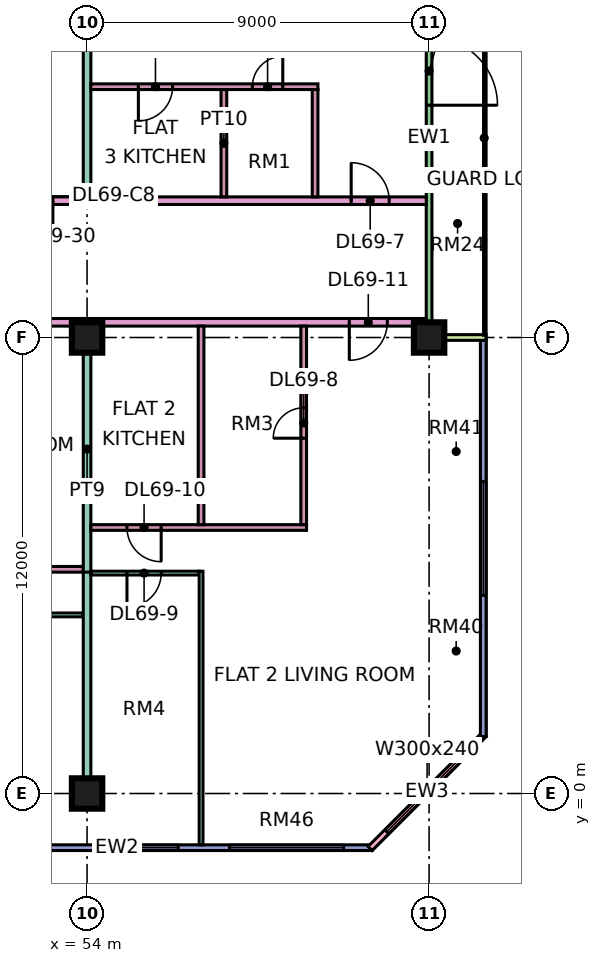
"""IFC4 building model, lengths in metres.
Left out: names, types, materials, properties, quantities, classifications, styles, units other than length and angle.
Written with IfcOpenShell. Run it as: python <this file> out.ifc"""

import sys

from ifc_helpers import new_model, si_unit, direction, frame, frame_2d, origin, origin_2d, place, context, subcontext, project, spatial, rectangle, extrude, element, fill, save


model = new_model("IFC4")
c1 = context("Model", 3, precision=1e-05, world=origin(), true_north=direction((0.0, 1.0)))
c2 = subcontext(c1, "Body", "Model", "MODEL_VIEW")
j1 = project(units=[si_unit("LENGTHUNIT", "METRE"), si_unit("PLANEANGLEUNIT", "RADIAN")], contexts=[c1])
p1 = place(None, origin())
s1 = spatial("IfcSite", under=j1, at=p1, CompositionType="ELEMENT")
p2 = place(p1, origin())
s2 = spatial("IfcBuilding", under=s1, at=p2, CompositionType="ELEMENT")
p3 = place(p2, frame((0.0, 0.0, 295.9)))
s3 = spatial("IfcBuildingStorey", under=s2, at=p3, CompositionType="ELEMENT", Elevation=295.9)
for number, where, z_axis, x_axis in (
    (1, (54.0, 0.0, 0.0), (0.0, 0.0, 1.0), (1.0, 0.0, 0.0)),
    (2, (54.0, 12.0, 0.0), (0.0, 0.0, 1.0), (1.0, 0.0, 0.0)),
    (3, (63.0, 12.0, 0.0), (0.0, 0.0, 1.0), (1.0, 0.0, 0.0)),
):
    element("IfcColumn", number, at=place(p3, frame(where, z_axis=z_axis, x_axis=x_axis)), inside=s3, PredefinedType="COLUMN", context=c2, shape_type="SweptSolid", body=[
        extrude(rectangle(XDim=0.8, YDim=0.8, at=origin_2d()), origin(), (0.0, 0.0, 1.0), 3.75),
    ])
p4 = place(p3, frame((48.075, -1.425, 0.0), z_axis=(0.0, 0.0, 1.0), x_axis=(1.0, 0.0, 0.0)))
e4 = element("IfcWall", 4, at=p4, inside=s3, PredefinedType="SOLIDWALL", context=c2, shape_type="SweptSolid", body=[
    extrude(rectangle(XDim=13.425, YDim=0.15, at=frame_2d((6.712, 0.0))), origin(), (0.0, 0.0, 1.0), 3.35),
])
p5 = place(p4, frame((1.462, 0.0, 0.45)))
e5 = element("IfcOpeningElement", 5, at=p5, cuts=e4, PredefinedType="OPENING", context=c2, shape_type="SweptSolid", body=[
    extrude(rectangle(XDim=3.0, YDim=2.4, at=frame_2d((1.5, 1.2))), frame((0.0, 0.085, 0.0), z_axis=(0.0, -1.0, 0.0), x_axis=(1.0, 0.0, 0.0)), (0.0, 0.0, 1.0), 0.17),
])
p6 = place(p4, frame((6.525, 0.0, 0.45)))
e6 = element("IfcOpeningElement", 6, at=p6, cuts=e4, PredefinedType="OPENING", context=c2, shape_type="SweptSolid", body=[
    extrude(rectangle(XDim=1.8, YDim=2.4, at=frame_2d((0.9, 1.2))), frame((0.0, 0.085, 0.0), z_axis=(0.0, -1.0, 0.0), x_axis=(1.0, 0.0, 0.0)), (0.0, 0.0, 1.0), 0.17),
])
p7 = place(p4, frame((9.675, 0.0, 0.45)))
e7 = element("IfcOpeningElement", 7, at=p7, cuts=e4, PredefinedType="OPENING", context=c2, shape_type="SweptSolid", body=[
    extrude(rectangle(XDim=3.0, YDim=2.4, at=frame_2d((1.5, 1.2))), frame((0.0, 0.085, 0.0), z_axis=(0.0, -1.0, 0.0), x_axis=(1.0, 0.0, 0.0)), (0.0, 0.0, 1.0), 0.17),
])
p8 = place(p3, frame((61.447, -1.447, 0.0), z_axis=(0.0, 0.0, 1.0), x_axis=(0.707106781187, 0.707106781187, 0.0)))
e8 = element("IfcWall", 8, at=p8, inside=s3, PredefinedType="SOLIDWALL", context=c2, shape_type="SweptSolid", body=[
    extrude(rectangle(XDim=4.243, YDim=0.15, at=frame_2d((2.121, 0.0))), origin(), (0.0, 0.0, 1.0), 3.35),
])
p9 = place(p8, frame((0.621, 0.0, 0.45)))
e9 = element("IfcOpeningElement", 9, at=p9, cuts=e8, PredefinedType="OPENING", context=c2, shape_type="SweptSolid", body=[
    extrude(rectangle(XDim=3.0, YDim=2.4, at=frame_2d((1.5, 1.2))), frame((0.0, 0.085, 0.0), z_axis=(0.0, -1.0, 0.0), x_axis=(1.0, 0.0, 0.0)), (0.0, 0.0, 1.0), 0.17),
])
p10 = place(p3, frame((64.425, 1.5, 0.0), z_axis=(0.0, 0.0, 1.0), x_axis=(0.0, 1.0, 0.0)))
e10 = element("IfcWall", 10, at=p10, inside=s3, PredefinedType="SOLIDWALL", context=c2, shape_type="SweptSolid", body=[
    extrude(rectangle(XDim=10.425, YDim=0.15, at=frame_2d((5.212, 0.0))), origin(), (0.0, 0.0, 1.0), 3.35),
])
p11 = place(p10, frame((3.712, 0.0, 0.45)))
e11 = element("IfcOpeningElement", 11, at=p11, cuts=e10, PredefinedType="OPENING", context=c2, shape_type="SweptSolid", body=[
    extrude(rectangle(XDim=3.0, YDim=2.4, at=frame_2d((1.5, 1.2))), frame((0.0, 0.085, 0.0), z_axis=(0.0, -1.0, 0.0), x_axis=(1.0, 0.0, 0.0)), (0.0, 0.0, 1.0), 0.17),
])
p12 = place(p3, frame((63.0, 12.075, 0.0), z_axis=(0.0, 0.0, 1.0), x_axis=(0.0, 1.0, 0.0)))
e12 = element("IfcWall", 12, at=p12, inside=s3, PredefinedType="SOLIDWALL", context=c2, shape_type="SweptSolid", body=[
    extrude(rectangle(XDim=10.35, YDim=0.15, at=frame_2d((5.175, 0.0))), origin(), (0.0, 0.0, 1.0), 3.35),
])
p13 = place(p12, frame((6.038, 0.0, 0.0)))
e13 = element("IfcOpeningElement", 13, at=p13, cuts=e12, PredefinedType="OPENING", context=c2, shape_type="SweptSolid", body=[
    extrude(rectangle(XDim=1.8, YDim=2.4, at=frame_2d((0.9, 1.2))), frame((0.0, 0.085, 0.0), z_axis=(0.0, -1.0, 0.0), x_axis=(1.0, 0.0, 0.0)), (0.0, 0.0, 1.0), 0.17),
])
p14 = place(p3, frame((64.5, 12.0, 0.0), z_axis=(0.0, 0.0, 1.0), x_axis=(-1.0, 0.0, 0.0)))
e14 = element("IfcWall", 14, at=p14, inside=s3, PredefinedType="SOLIDWALL", context=c2, shape_type="SweptSolid", body=[
    extrude(rectangle(XDim=1.5, YDim=0.15, at=frame_2d((0.75, 0.0))), origin(), (0.0, 0.0, 1.0), 3.35),
])
p15 = place(p3, frame((33.05, 4.7, 0.0), z_axis=(0.0, 0.0, 1.0), x_axis=(1.0, 0.0, 0.0)))
e15 = element("IfcWall", 15, at=p15, inside=s3, PredefinedType="PARTITIONING", context=c2, shape_type="SweptSolid", body=[
    extrude(rectangle(XDim=20.85, YDim=0.1, at=frame_2d((10.425, 0.0))), origin(), (0.0, 0.0, 1.0), 3.35),
])
p16 = place(p15, frame((1.0, 0.0, 0.0)))
e16 = element("IfcOpeningElement", 16, at=p16, cuts=e15, PredefinedType="OPENING", context=c2, shape_type="SweptSolid", body=[
    extrude(rectangle(XDim=0.9, YDim=2.1, at=frame_2d((0.45, 1.05))), frame((0.0, 0.06, 0.0), z_axis=(0.0, -1.0, 0.0), x_axis=(1.0, 0.0, 0.0)), (0.0, 0.0, 1.0), 0.12),
])
p17 = place(p15, frame((4.0, 0.0, 0.0)))
e17 = element("IfcOpeningElement", 17, at=p17, cuts=e15, PredefinedType="OPENING", context=c2, shape_type="SweptSolid", body=[
    extrude(rectangle(XDim=0.9, YDim=2.1, at=frame_2d((0.45, 1.05))), frame((0.0, 0.06, 0.0), z_axis=(0.0, -1.0, 0.0), x_axis=(1.0, 0.0, 0.0)), (0.0, 0.0, 1.0), 0.12),
])
p18 = place(p15, frame((7.0, 0.0, 0.0)))
e18 = element("IfcOpeningElement", 18, at=p18, cuts=e15, PredefinedType="OPENING", context=c2, shape_type="SweptSolid", body=[
    extrude(rectangle(XDim=0.9, YDim=2.1, at=frame_2d((0.45, 1.05))), frame((0.0, 0.06, 0.0), z_axis=(0.0, -1.0, 0.0), x_axis=(1.0, 0.0, 0.0)), (0.0, 0.0, 1.0), 0.12),
])
p19 = place(p15, frame((10.0, 0.0, 0.0)))
e19 = element("IfcOpeningElement", 19, at=p19, cuts=e15, PredefinedType="OPENING", context=c2, shape_type="SweptSolid", body=[
    extrude(rectangle(XDim=0.9, YDim=2.1, at=frame_2d((0.45, 1.05))), frame((0.0, 0.06, 0.0), z_axis=(0.0, -1.0, 0.0), x_axis=(1.0, 0.0, 0.0)), (0.0, 0.0, 1.0), 0.12),
])
p20 = place(p15, frame((16.0, 0.0, 0.0)))
e20 = element("IfcOpeningElement", 20, at=p20, cuts=e15, PredefinedType="OPENING", context=c2, shape_type="SweptSolid", body=[
    extrude(rectangle(XDim=0.9, YDim=2.1, at=frame_2d((0.45, 1.05))), frame((0.0, 0.06, 0.0), z_axis=(0.0, -1.0, 0.0), x_axis=(1.0, 0.0, 0.0)), (0.0, 0.0, 1.0), 0.12),
])
p21 = place(p3, frame((40.65, 12.4, 0.0), z_axis=(0.0, 0.0, 1.0), x_axis=(1.0, 0.0, 0.0)))
e21 = element("IfcWall", 21, at=p21, inside=s3, PredefinedType="PARTITIONING", context=c2, shape_type="SweptSolid", body=[
    extrude(rectangle(XDim=22.276, YDim=0.2, at=frame_2d((11.138, 0.0))), origin(), (0.0, 0.0, 1.0), 3.35),
])
p22 = place(p21, frame((20.25, 0.0, 0.0)))
e22 = element("IfcOpeningElement", 22, at=p22, cuts=e21, PredefinedType="OPENING", context=c2, shape_type="SweptSolid", body=[
    extrude(rectangle(XDim=1.0, YDim=2.1, at=frame_2d((0.5, 1.05))), frame((0.0, 0.11, 0.0), z_axis=(0.0, -1.0, 0.0), x_axis=(1.0, 0.0, 0.0)), (0.0, 0.0, 1.0), 0.22),
])
p23 = place(p21, frame((1.05, 0.0, 0.0)))
e23 = element("IfcOpeningElement", 23, at=p23, cuts=e21, PredefinedType="OPENING", context=c2, shape_type="SweptSolid", body=[
    extrude(rectangle(XDim=1.0, YDim=2.1, at=frame_2d((0.5, 1.05))), frame((0.0, 0.11, 0.0), z_axis=(0.0, -1.0, 0.0), x_axis=(1.0, 0.0, 0.0)), (0.0, 0.0, 1.0), 0.22),
])
p24 = place(p3, frame((43.575, 5.9, 0.0), z_axis=(0.0, 0.0, 1.0), x_axis=(1.0, 0.0, 0.0)))
e24 = element("IfcWall", 24, at=p24, inside=s3, PredefinedType="PARTITIONING", context=c2, shape_type="SweptSolid", body=[
    extrude(rectangle(XDim=10.325, YDim=0.15, at=frame_2d((5.163, 0.0))), origin(), (0.0, 0.0, 1.0), 3.35),
])
p25 = place(p24, frame((1.825, 0.0, 0.0)))
e25 = element("IfcOpeningElement", 25, at=p25, cuts=e24, PredefinedType="OPENING", context=c2, shape_type="SweptSolid", body=[
    extrude(rectangle(XDim=0.8, YDim=2.1, at=frame_2d((0.4, 1.05))), frame((0.0, 0.085, 0.0), z_axis=(0.0, -1.0, 0.0), x_axis=(1.0, 0.0, 0.0)), (0.0, 0.0, 1.0), 0.17),
])
p26 = place(p24, frame((6.975, 0.0, 0.0)))
e26 = element("IfcOpeningElement", 26, at=p26, cuts=e24, PredefinedType="OPENING", context=c2, shape_type="SweptSolid", body=[
    extrude(rectangle(XDim=0.9, YDim=2.1, at=frame_2d((0.45, 1.05))), frame((0.0, 0.085, 0.0), z_axis=(0.0, -1.0, 0.0), x_axis=(1.0, 0.0, 0.0)), (0.0, 0.0, 1.0), 0.17),
])
p27 = place(p3, frame((51.225, 15.6, 0.0), z_axis=(0.0, 0.0, 1.0), x_axis=(1.0, 0.0, 0.0)))
e27 = element("IfcWall", 27, at=p27, inside=s3, PredefinedType="PARTITIONING", context=c2, shape_type="SweptSolid", body=[
    extrude(rectangle(XDim=11.701, YDim=0.2, at=frame_2d((5.851, 0.0))), origin(), (0.0, 0.0, 1.0), 3.35),
])
p28 = place(p27, frame((9.725, 0.0, 0.0)))
e28 = element("IfcOpeningElement", 28, at=p28, cuts=e27, PredefinedType="OPENING", context=c2, shape_type="SweptSolid", body=[
    extrude(rectangle(XDim=1.0, YDim=2.1, at=frame_2d((0.5, 1.05))), frame((0.0, 0.11, 0.0), z_axis=(0.0, -1.0, 0.0), x_axis=(1.0, 0.0, 0.0)), (0.0, 0.0, 1.0), 0.22),
])
p29 = place(p27, frame((0.875, 0.0, 0.0)))
e29 = element("IfcOpeningElement", 29, at=p29, cuts=e27, PredefinedType="OPENING", context=c2, shape_type="SweptSolid", body=[
    extrude(rectangle(XDim=1.0, YDim=2.1, at=frame_2d((0.5, 1.05))), frame((0.0, 0.11, 0.0), z_axis=(0.0, -1.0, 0.0), x_axis=(1.0, 0.0, 0.0)), (0.0, 0.0, 1.0), 0.22),
])
p30 = place(p3, frame((54.0, 0.0, 0.0), z_axis=(0.0, 0.0, 1.0), x_axis=(0.0, 1.0, 0.0)))
e30 = element("IfcWall", 30, at=p30, inside=s3, PredefinedType="PARTITIONING", context=c2, shape_type="SweptSolid", body=[
    extrude(rectangle(XDim=5.85, YDim=0.2, at=frame_2d((2.925, 0.0))), origin(), (0.0, 0.0, 1.0), 3.35),
])
p31 = place(p3, frame((54.0, 5.825, 0.0), z_axis=(0.0, 0.0, 1.0), x_axis=(0.0, 1.0, 0.0)))
e31 = element("IfcWall", 31, at=p31, inside=s3, PredefinedType="PARTITIONING", context=c2, shape_type="SweptSolid", body=[
    extrude(rectangle(XDim=6.475, YDim=0.2, at=frame_2d((3.238, 0.0))), origin(), (0.0, 0.0, 1.0), 3.35),
])
p32 = place(p3, frame((54.0, 15.7, 0.0), z_axis=(0.0, 0.0, 1.0), x_axis=(0.0, 1.0, 0.0)))
e32 = element("IfcWall", 32, at=p32, inside=s3, PredefinedType="PARTITIONING", context=c2, shape_type="SweptSolid", body=[
    extrude(rectangle(XDim=8.3, YDim=0.2, at=frame_2d((4.15, 0.0))), origin(), (0.0, 0.0, 1.0), 3.35),
])
p33 = place(p3, frame((54.1, 5.8, 0.0), z_axis=(0.0, 0.0, 1.0), x_axis=(1.0, 0.0, 0.0)))
e33 = element("IfcWall", 33, at=p33, inside=s3, PredefinedType="PARTITIONING", context=c2, shape_type="SweptSolid", body=[
    extrude(rectangle(XDim=2.85, YDim=0.1, at=frame_2d((1.425, 0.0))), origin(), (0.0, 0.0, 1.0), 3.35),
])
p34 = place(p33, frame((0.95, 0.0, 0.0)))
e34 = element("IfcOpeningElement", 34, at=p34, cuts=e33, PredefinedType="OPENING", context=c2, shape_type="SweptSolid", body=[
    extrude(rectangle(XDim=0.9, YDim=2.1, at=frame_2d((0.45, 1.05))), frame((0.0, 0.06, 0.0), z_axis=(0.0, -1.0, 0.0), x_axis=(1.0, 0.0, 0.0)), (0.0, 0.0, 1.0), 0.12),
])
p35 = place(p3, frame((54.1, 7.0, 0.0), z_axis=(0.0, 0.0, 1.0), x_axis=(1.0, 0.0, 0.0)))
e35 = element("IfcWall", 35, at=p35, inside=s3, PredefinedType="PARTITIONING", context=c2, shape_type="SweptSolid", body=[
    extrude(rectangle(XDim=5.675, YDim=0.15, at=frame_2d((2.837, 0.0))), origin(), (0.0, 0.0, 1.0), 3.35),
])
p36 = place(p35, frame((0.95, 0.0, 0.0)))
e36 = element("IfcOpeningElement", 36, at=p36, cuts=e35, PredefinedType="OPENING", context=c2, shape_type="SweptSolid", body=[
    extrude(rectangle(XDim=0.9, YDim=2.1, at=frame_2d((0.45, 1.05))), frame((0.0, 0.085, 0.0), z_axis=(0.0, -1.0, 0.0), x_axis=(1.0, 0.0, 0.0)), (0.0, 0.0, 1.0), 0.17),
])
p37 = place(p3, frame((54.1, 18.6, 0.0), z_axis=(0.0, 0.0, 1.0), x_axis=(1.0, 0.0, 0.0)))
e37 = element("IfcWall", 37, at=p37, inside=s3, PredefinedType="PARTITIONING", context=c2, shape_type="SweptSolid", body=[
    extrude(rectangle(XDim=5.975, YDim=0.15, at=frame_2d((2.987, 0.0))), origin(), (0.0, 0.0, 1.0), 3.35),
])
p38 = place(p37, frame((4.25, 0.0, 0.0)))
e38 = element("IfcOpeningElement", 38, at=p38, cuts=e37, PredefinedType="OPENING", context=c2, shape_type="SweptSolid", body=[
    extrude(rectangle(XDim=0.8, YDim=2.1, at=frame_2d((0.4, 1.05))), frame((0.0, 0.085, 0.0), z_axis=(0.0, -1.0, 0.0), x_axis=(1.0, 0.0, 0.0)), (0.0, 0.0, 1.0), 0.17),
])
p39 = place(p37, frame((1.25, 0.0, 0.0)))
e39 = element("IfcOpeningElement", 39, at=p39, cuts=e37, PredefinedType="OPENING", context=c2, shape_type="SweptSolid", body=[
    extrude(rectangle(XDim=0.9, YDim=2.1, at=frame_2d((0.45, 1.05))), frame((0.0, 0.085, 0.0), z_axis=(0.0, -1.0, 0.0), x_axis=(1.0, 0.0, 0.0)), (0.0, 0.0, 1.0), 0.17),
])
p40 = place(p3, frame((57.0, -1.35, 0.0), z_axis=(0.0, 0.0, 1.0), x_axis=(0.0, 1.0, 0.0)))
e40 = element("IfcWall", 40, at=p40, inside=s3, PredefinedType="PARTITIONING", context=c2, shape_type="SweptSolid", body=[
    extrude(rectangle(XDim=7.2, YDim=0.1, at=frame_2d((3.6, 0.0))), origin(), (0.0, 0.0, 1.0), 3.35),
])
p41 = place(p3, frame((57.0, 7.075, 0.0), z_axis=(0.0, 0.0, 1.0), x_axis=(0.0, 1.0, 0.0)))
e41 = element("IfcWall", 41, at=p41, inside=s3, PredefinedType="PARTITIONING", context=c2, shape_type="SweptSolid", body=[
    extrude(rectangle(XDim=5.225, YDim=0.15, at=frame_2d((2.613, 0.0))), origin(), (0.0, 0.0, 1.0), 3.35),
])
p42 = place(p3, frame((57.6, 15.7, 0.0), z_axis=(0.0, 0.0, 1.0), x_axis=(0.0, 1.0, 0.0)))
e42 = element("IfcWall", 42, at=p42, inside=s3, PredefinedType="PARTITIONING", context=c2, shape_type="SweptSolid", body=[
    extrude(rectangle(XDim=2.825, YDim=0.15, at=frame_2d((1.413, 0.0))), origin(), (0.0, 0.0, 1.0), 3.35),
])
p43 = place(p3, frame((59.7, 7.075, 0.0), z_axis=(0.0, 0.0, 1.0), x_axis=(0.0, 1.0, 0.0)))
e43 = element("IfcWall", 43, at=p43, inside=s3, PredefinedType="PARTITIONING", context=c2, shape_type="SweptSolid", body=[
    extrude(rectangle(XDim=5.225, YDim=0.15, at=frame_2d((2.613, 0.0))), origin(), (0.0, 0.0, 1.0), 3.35),
])
p44 = place(p43, frame((2.275, 0.0, 0.0)))
e44 = element("IfcOpeningElement", 44, at=p44, cuts=e43, PredefinedType="OPENING", context=c2, shape_type="SweptSolid", body=[
    extrude(rectangle(XDim=0.8, YDim=2.1, at=frame_2d((0.4, 1.05))), frame((0.0, 0.085, 0.0), z_axis=(0.0, -1.0, 0.0), x_axis=(1.0, 0.0, 0.0)), (0.0, 0.0, 1.0), 0.17),
])
p45 = place(p3, frame((60.0, 15.7, 0.0), z_axis=(0.0, 0.0, 1.0), x_axis=(0.0, 1.0, 0.0)))
e45 = element("IfcWall", 45, at=p45, inside=s3, PredefinedType="PARTITIONING", context=c2, shape_type="SweptSolid", body=[
    extrude(rectangle(XDim=2.825, YDim=0.15, at=frame_2d((1.413, 0.0))), origin(), (0.0, 0.0, 1.0), 3.35),
])
p46 = place(p6, origin())
e46 = element("IfcWindow", 46, at=p46, inside=s3, PartitioningType="SINGLE_PANEL", PredefinedType="WINDOW", context=c2, shape_type="SweptSolid", body=[
    extrude(rectangle(XDim=1.8, YDim=2.4, at=frame_2d((0.9, 1.2))), frame((0.0, 0.03, 0.0), z_axis=(0.0, -1.0, 0.0), x_axis=(1.0, 0.0, 0.0)), (0.0, 0.0, 1.0), 0.06),
])
fill(e6, e46)
p47 = place(p7, origin())
e47 = element("IfcWindow", 47, at=p47, inside=s3, PartitioningType="SINGLE_PANEL", PredefinedType="WINDOW", context=c2, shape_type="SweptSolid", body=[
    extrude(rectangle(XDim=3.0, YDim=2.4, at=frame_2d((1.5, 1.2))), frame((0.0, 0.03, 0.0), z_axis=(0.0, -1.0, 0.0), x_axis=(1.0, 0.0, 0.0)), (0.0, 0.0, 1.0), 0.06),
])
fill(e7, e47)
p48 = place(p9, origin())
e48 = element("IfcWindow", 48, at=p48, inside=s3, PartitioningType="SINGLE_PANEL", PredefinedType="WINDOW", context=c2, shape_type="SweptSolid", body=[
    extrude(rectangle(XDim=3.0, YDim=2.4, at=frame_2d((1.5, 1.2))), frame((0.0, 0.03, 0.0), z_axis=(0.0, -1.0, 0.0), x_axis=(1.0, 0.0, 0.0)), (0.0, 0.0, 1.0), 0.06),
])
fill(e9, e48)
p49 = place(p11, origin())
e49 = element("IfcWindow", 49, at=p49, inside=s3, PartitioningType="SINGLE_PANEL", PredefinedType="WINDOW", context=c2, shape_type="SweptSolid", body=[
    extrude(rectangle(XDim=3.0, YDim=2.4, at=frame_2d((1.5, 1.2))), frame((0.0, 0.03, 0.0), z_axis=(0.0, -1.0, 0.0), x_axis=(1.0, 0.0, 0.0)), (0.0, 0.0, 1.0), 0.06),
])
fill(e11, e49)
p50 = place(p13, frame((1.8, 0.0, 0.0), z_axis=(0.0, 0.0, 1.0), x_axis=(-1.0, 0.0, 0.0)))
e50 = element("IfcDoor", 50, at=p50, inside=s3, OperationType="DOUBLE_DOOR_SINGLE_SWING", PredefinedType="DOOR", context=c2, shape_type="SweptSolid", body=[
    extrude(rectangle(XDim=1.8, YDim=2.4, at=frame_2d((0.9, 1.2))), frame((0.0, 0.025, 0.0), z_axis=(0.0, -1.0, 0.0), x_axis=(1.0, 0.0, 0.0)), (0.0, 0.0, 1.0), 0.05),
])
fill(e13, e50)
p51 = place(p38, frame((0.8, 0.0, 0.0), z_axis=(0.0, 0.0, 1.0), x_axis=(-1.0, 0.0, 0.0)))
e51 = element("IfcDoor", 51, at=p51, inside=s3, OperationType="SINGLE_SWING_RIGHT", PredefinedType="DOOR", context=c2, shape_type="SweptSolid", body=[
    extrude(rectangle(XDim=0.8, YDim=2.1, at=frame_2d((0.4, 1.05))), frame((0.0, 0.025, 0.0), z_axis=(0.0, -1.0, 0.0), x_axis=(1.0, 0.0, 0.0)), (0.0, 0.0, 1.0), 0.05),
])
fill(e38, e51)
p52 = place(p39, frame((0.9, 0.0, 0.0), z_axis=(0.0, 0.0, 1.0), x_axis=(-1.0, 0.0, 0.0)))
e52 = element("IfcDoor", 52, at=p52, inside=s3, OperationType="SINGLE_SWING_LEFT", PredefinedType="DOOR", context=c2, shape_type="SweptSolid", body=[
    extrude(rectangle(XDim=0.9, YDim=2.1, at=frame_2d((0.45, 1.05))), frame((0.0, 0.025, 0.0), z_axis=(0.0, -1.0, 0.0), x_axis=(1.0, 0.0, 0.0)), (0.0, 0.0, 1.0), 0.05),
])
fill(e39, e52)
p53 = place(p28, origin())
e53 = element("IfcDoor", 53, at=p53, inside=s3, OperationType="SINGLE_SWING_LEFT", PredefinedType="DOOR", context=c2, shape_type="SweptSolid", body=[
    extrude(rectangle(XDim=1.0, YDim=2.1, at=frame_2d((0.5, 1.05))), frame((0.0, 0.025, 0.0), z_axis=(0.0, -1.0, 0.0), x_axis=(1.0, 0.0, 0.0)), (0.0, 0.0, 1.0), 0.05),
])
fill(e28, e53)
p54 = place(p44, origin())
e54 = element("IfcDoor", 54, at=p54, inside=s3, OperationType="SINGLE_SWING_LEFT", PredefinedType="DOOR", context=c2, shape_type="SweptSolid", body=[
    extrude(rectangle(XDim=0.8, YDim=2.1, at=frame_2d((0.4, 1.05))), frame((0.0, 0.025, 0.0), z_axis=(0.0, -1.0, 0.0), x_axis=(1.0, 0.0, 0.0)), (0.0, 0.0, 1.0), 0.05),
])
fill(e44, e54)
p55 = place(p34, frame((0.9, 0.0, 0.0), z_axis=(0.0, 0.0, 1.0), x_axis=(-1.0, 0.0, 0.0)))
e55 = element("IfcDoor", 55, at=p55, inside=s3, OperationType="SINGLE_SWING_LEFT", PredefinedType="DOOR", context=c2, shape_type="SweptSolid", body=[
    extrude(rectangle(XDim=0.9, YDim=2.1, at=frame_2d((0.45, 1.05))), frame((0.0, 0.025, 0.0), z_axis=(0.0, -1.0, 0.0), x_axis=(1.0, 0.0, 0.0)), (0.0, 0.0, 1.0), 0.05),
])
fill(e34, e55)
p56 = place(p36, origin())
e56 = element("IfcDoor", 56, at=p56, inside=s3, OperationType="SINGLE_SWING_RIGHT", PredefinedType="DOOR", context=c2, shape_type="SweptSolid", body=[
    extrude(rectangle(XDim=0.9, YDim=2.1, at=frame_2d((0.45, 1.05))), frame((0.0, 0.025, 0.0), z_axis=(0.0, -1.0, 0.0), x_axis=(1.0, 0.0, 0.0)), (0.0, 0.0, 1.0), 0.05),
])
fill(e36, e56)
p57 = place(p22, frame((1.0, 0.0, 0.0), z_axis=(0.0, 0.0, 1.0), x_axis=(-1.0, 0.0, 0.0)))
e57 = element("IfcDoor", 57, at=p57, inside=s3, OperationType="SINGLE_SWING_LEFT", PredefinedType="DOOR", context=c2, shape_type="SweptSolid", body=[
    extrude(rectangle(XDim=1.0, YDim=2.1, at=frame_2d((0.5, 1.05))), frame((0.0, 0.025, 0.0), z_axis=(0.0, -1.0, 0.0), x_axis=(1.0, 0.0, 0.0)), (0.0, 0.0, 1.0), 0.05),
])
fill(e22, e57)
p58 = place(p29, origin())
e58 = element("IfcDoor", 58, at=p58, inside=s3, OperationType="SINGLE_SWING_RIGHT", PredefinedType="DOOR", context=c2, shape_type="SweptSolid", body=[
    extrude(rectangle(XDim=1.0, YDim=2.1, at=frame_2d((0.5, 1.05))), frame((0.0, 0.025, 0.0), z_axis=(0.0, -1.0, 0.0), x_axis=(1.0, 0.0, 0.0)), (0.0, 0.0, 1.0), 0.05),
])
fill(e29, e58)
save(model, sys.argv[1])
